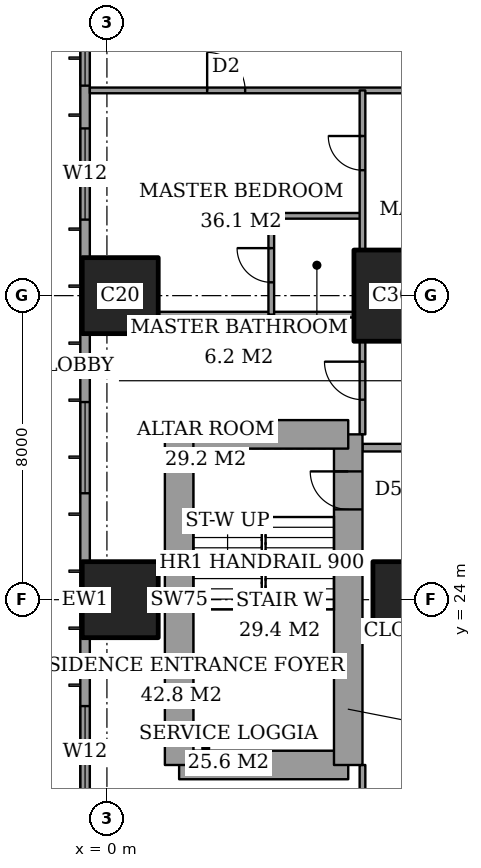
"""IFC4 building model, lengths in metres.
Left out: names, types, materials, properties, quantities, classifications, styles, units other than length and angle.
Written with IfcOpenShell. Run it as: python <this file> out.ifc"""

import sys

from ifc_helpers import new_model, si_unit, direction, frame, frame_2d, origin, origin_2d, place, context, subcontext, project, spatial, rectangle, extrude, element, fill, save


model = new_model("IFC4")
c1 = context("Model", 3, precision=1e-05, world=origin(), true_north=direction((0.0, 1.0)))
c2 = subcontext(c1, "Body", "Model", "MODEL_VIEW")
j1 = project(units=[si_unit("LENGTHUNIT", "METRE"), si_unit("PLANEANGLEUNIT", "RADIAN")], contexts=[c1])
p1 = place(None, origin())
s1 = spatial("IfcSite", under=j1, at=p1, CompositionType="ELEMENT")
p2 = place(p1, origin())
s2 = spatial("IfcBuilding", under=s1, at=p2, CompositionType="ELEMENT")
p3 = place(p2, frame((0.0, 0.0, 143.0)))
s3 = spatial("IfcBuildingStorey", under=s2, at=p3, CompositionType="ELEMENT", Elevation=143.0)
for number, where, z_axis, x_axis in (
    (1, (0.35, 24.0, 0.0), (0.0, 0.0, 1.0), (1.0, 0.0, 0.0)),
    (2, (0.35, 32.0, 0.0), (0.0, 0.0, 1.0), (1.0, 0.0, 0.0)),
    (3, (8.0, 24.0, 0.0), (0.0, 0.0, 1.0), (1.0, 0.0, 0.0)),
):
    element("IfcColumn", number, at=place(p3, frame(where, z_axis=z_axis, x_axis=x_axis)), inside=s3, PredefinedType="COLUMN", context=c2, shape_type="SweptSolid", body=[
        extrude(rectangle(XDim=2.0, YDim=2.0, at=origin_2d()), origin(), (0.0, 0.0, 1.0), 3.6),
    ])
p4 = place(p3, frame((8.0, 32.0, 0.0), z_axis=(0.0, 0.0, 1.0), x_axis=(1.0, 0.0, 0.0)))
e4 = element("IfcColumn", 4, at=p4, inside=s3, PredefinedType="COLUMN", context=c2, shape_type="SweptSolid", body=[
    extrude(rectangle(XDim=3.0, YDim=2.4, at=origin_2d()), origin(), (0.0, 0.0, 1.0), 3.6),
])
p5 = place(p3, frame((1.9, 19.65, 0.0), z_axis=(0.0, 0.0, 1.0), x_axis=(1.0, 0.0, 0.0)))
e5 = element("IfcWall", 5, at=p5, inside=s3, PredefinedType="SHEAR", context=c2, shape_type="SweptSolid", body=[
    extrude(rectangle(XDim=4.45, YDim=0.75, at=frame_2d((2.225, 0.0))), origin(), (0.0, 0.0, 1.0), 3.6),
])
p6 = place(p3, frame((6.35, 19.65, 0.0), z_axis=(0.0, 0.0, 1.0), x_axis=(0.0, 1.0, 0.0)))
e6 = element("IfcWall", 6, at=p6, inside=s3, PredefinedType="SHEAR", context=c2, shape_type="SweptSolid", body=[
    extrude(rectangle(XDim=8.7, YDim=0.75, at=frame_2d((4.35, 0.0))), origin(), (0.0, 0.0, 1.0), 3.6),
])
p7 = place(p6, frame((6.725, 0.0, 0.0)))
e7 = element("IfcOpeningElement", 7, at=p7, cuts=e6, PredefinedType="OPENING", context=c2, shape_type="SweptSolid", body=[
    extrude(rectangle(XDim=1.0, YDim=2.1, at=frame_2d((0.5, 1.05))), frame((0.0, 0.385, 0.0), z_axis=(0.0, -1.0, 0.0), x_axis=(1.0, 0.0, 0.0)), (0.0, 0.0, 1.0), 0.77),
])
p8 = place(p3, frame((6.35, 28.35, 0.0), z_axis=(0.0, 0.0, 1.0), x_axis=(-1.0, 0.0, 0.0)))
e8 = element("IfcWall", 8, at=p8, inside=s3, PredefinedType="SHEAR", context=c2, shape_type="SweptSolid", body=[
    extrude(rectangle(XDim=4.45, YDim=0.75, at=frame_2d((2.225, 0.0))), origin(), (0.0, 0.0, 1.0), 3.6),
])
p9 = place(p3, frame((1.9, 28.35, 0.0), z_axis=(0.0, 0.0, 1.0), x_axis=(0.0, -1.0, 0.0)))
e9 = element("IfcWall", 9, at=p9, inside=s3, PredefinedType="SHEAR", context=c2, shape_type="SweptSolid", body=[
    extrude(rectangle(XDim=8.7, YDim=0.75, at=frame_2d((4.35, 0.0))), origin(), (0.0, 0.0, 1.0), 3.6),
])
p10 = place(p3, frame((-0.575, 44.825, 0.0), z_axis=(0.0, 0.0, 1.0), x_axis=(0.0, -1.0, 0.0)))
e10 = element("IfcWall", 10, at=p10, inside=s3, PredefinedType="SOLIDWALL", context=c2, shape_type="SweptSolid", body=[
    extrude(rectangle(XDim=41.65, YDim=0.25, at=frame_2d((20.825, 0.0))), origin(), (0.0, 0.0, 1.0), 3.6),
])
p11 = place(p10, frame((0.775, 0.0, 0.4)))
e11 = element("IfcOpeningElement", 11, at=p11, cuts=e10, PredefinedType="OPENING", context=c2, shape_type="SweptSolid", body=[
    extrude(rectangle(XDim=2.4, YDim=2.2, at=frame_2d((1.2, 1.1))), frame((0.0, 0.135, 0.0), z_axis=(0.0, -1.0, 0.0), x_axis=(1.0, 0.0, 0.0)), (0.0, 0.0, 1.0), 0.27),
])
p12 = place(p10, frame((6.1, 0.0, 0.4)))
e12 = element("IfcOpeningElement", 12, at=p12, cuts=e10, PredefinedType="OPENING", context=c2, shape_type="SweptSolid", body=[
    extrude(rectangle(XDim=1.2, YDim=2.2, at=frame_2d((0.6, 1.1))), frame((0.0, 0.135, 0.0), z_axis=(0.0, -1.0, 0.0), x_axis=(1.0, 0.0, 0.0)), (0.0, 0.0, 1.0), 0.27),
])
p13 = place(p10, frame((8.425, 0.0, 0.4)))
e13 = element("IfcOpeningElement", 13, at=p13, cuts=e10, PredefinedType="OPENING", context=c2, shape_type="SweptSolid", body=[
    extrude(rectangle(XDim=2.4, YDim=2.2, at=frame_2d((1.2, 1.1))), frame((0.0, 0.135, 0.0), z_axis=(0.0, -1.0, 0.0), x_axis=(1.0, 0.0, 0.0)), (0.0, 0.0, 1.0), 0.27),
])
p14 = place(p10, frame((15.625, 0.0, 0.4)))
e14 = element("IfcOpeningElement", 14, at=p14, cuts=e10, PredefinedType="OPENING", context=c2, shape_type="SweptSolid", body=[
    extrude(rectangle(XDim=2.4, YDim=2.2, at=frame_2d((1.2, 1.1))), frame((0.0, 0.135, 0.0), z_axis=(0.0, -1.0, 0.0), x_axis=(1.0, 0.0, 0.0)), (0.0, 0.0, 1.0), 0.27),
])
p15 = place(p10, frame((23.625, 0.0, 0.4)))
e15 = element("IfcOpeningElement", 15, at=p15, cuts=e10, PredefinedType="OPENING", context=c2, shape_type="SweptSolid", body=[
    extrude(rectangle(XDim=2.4, YDim=2.2, at=frame_2d((1.2, 1.1))), frame((0.0, 0.135, 0.0), z_axis=(0.0, -1.0, 0.0), x_axis=(1.0, 0.0, 0.0)), (0.0, 0.0, 1.0), 0.27),
])
p16 = place(p10, frame((30.625, 0.0, 0.4)))
e16 = element("IfcOpeningElement", 16, at=p16, cuts=e10, PredefinedType="OPENING", context=c2, shape_type="SweptSolid", body=[
    extrude(rectangle(XDim=2.4, YDim=2.2, at=frame_2d((1.2, 1.1))), frame((0.0, 0.135, 0.0), z_axis=(0.0, -1.0, 0.0), x_axis=(1.0, 0.0, 0.0)), (0.0, 0.0, 1.0), 0.27),
])
p17 = place(p10, frame((34.225, 0.0, 0.4)))
e17 = element("IfcOpeningElement", 17, at=p17, cuts=e10, PredefinedType="OPENING", context=c2, shape_type="SweptSolid", body=[
    extrude(rectangle(XDim=1.2, YDim=2.2, at=frame_2d((0.6, 1.1))), frame((0.0, 0.135, 0.0), z_axis=(0.0, -1.0, 0.0), x_axis=(1.0, 0.0, 0.0)), (0.0, 0.0, 1.0), 0.27),
])
p18 = place(p10, frame((38.475, 0.0, 0.4)))
e18 = element("IfcOpeningElement", 18, at=p18, cuts=e10, PredefinedType="OPENING", context=c2, shape_type="SweptSolid", body=[
    extrude(rectangle(XDim=2.4, YDim=2.2, at=frame_2d((1.2, 1.1))), frame((0.0, 0.135, 0.0), z_axis=(0.0, -1.0, 0.0), x_axis=(1.0, 0.0, 0.0)), (0.0, 0.0, 1.0), 0.27),
])
p19 = place(p3, frame((6.725, 28.0, 0.0), z_axis=(0.0, 0.0, 1.0), x_axis=(1.0, 0.0, 0.0)))
e19 = element("IfcWall", 19, at=p19, inside=s3, PredefinedType="PARTITIONING", context=c2, shape_type="SweptSolid", body=[
    extrude(rectangle(XDim=17.275, YDim=0.2, at=frame_2d((8.637, 0.0))), origin(), (0.0, 0.0, 1.0), 3.35),
])
p20 = place(p19, frame((6.475, 0.0, 0.0)))
e20 = element("IfcOpeningElement", 20, at=p20, cuts=e19, PredefinedType="OPENING", context=c2, shape_type="SweptSolid", body=[
    extrude(rectangle(XDim=1.2, YDim=2.4, at=frame_2d((0.6, 1.2))), frame((0.0, 0.11, 0.0), z_axis=(0.0, -1.0, 0.0), x_axis=(1.0, 0.0, 0.0)), (0.0, 0.0, 1.0), 0.22),
])
p21 = place(p3, frame((1.35, 31.5, 0.0), z_axis=(0.0, 0.0, 1.0), x_axis=(1.0, 0.0, 0.0)))
e21 = element("IfcWall", 21, at=p21, inside=s3, PredefinedType="PARTITIONING", context=c2, shape_type="SweptSolid", body=[
    extrude(rectangle(XDim=5.15, YDim=0.15, at=frame_2d((2.575, 0.0))), origin(), (0.0, 0.0, 1.0), 3.35),
])
p22 = place(p3, frame((4.325, 34.1, 0.0), z_axis=(0.0, 0.0, 1.0), x_axis=(1.0, 0.0, 0.0)))
e22 = element("IfcWall", 22, at=p22, inside=s3, PredefinedType="PARTITIONING", context=c2, shape_type="SweptSolid", body=[
    extrude(rectangle(XDim=2.4, YDim=0.15, at=frame_2d((1.2, 0.0))), origin(), (0.0, 0.0, 1.0), 3.35),
])
p23 = place(p3, frame((-0.45, 37.4, 0.0), z_axis=(0.0, 0.0, 1.0), x_axis=(1.0, 0.0, 0.0)))
e23 = element("IfcWall", 23, at=p23, inside=s3, PredefinedType="PARTITIONING", context=c2, shape_type="SweptSolid", body=[
    extrude(rectangle(XDim=25.011, YDim=0.15, at=frame_2d((12.505, 0.0))), origin(), (0.0, 0.0, 1.0), 3.35),
])
p24 = place(p23, frame((10.65, 0.0, 0.0)))
e24 = element("IfcOpeningElement", 24, at=p24, cuts=e23, PredefinedType="OPENING", context=c2, shape_type="SweptSolid", body=[
    extrude(rectangle(XDim=1.0, YDim=2.1, at=frame_2d((0.5, 1.05))), frame((0.0, 0.085, 0.0), z_axis=(0.0, -1.0, 0.0), x_axis=(1.0, 0.0, 0.0)), (0.0, 0.0, 1.0), 0.17),
])
p25 = place(p23, frame((3.087, 0.0, 0.0)))
e25 = element("IfcOpeningElement", 25, at=p25, cuts=e23, PredefinedType="OPENING", context=c2, shape_type="SweptSolid", body=[
    extrude(rectangle(XDim=1.0, YDim=2.1, at=frame_2d((0.5, 1.05))), frame((0.0, 0.085, 0.0), z_axis=(0.0, -1.0, 0.0), x_axis=(1.0, 0.0, 0.0)), (0.0, 0.0, 1.0), 0.17),
])
p26 = place(p23, frame((13.45, 0.0, 0.0)))
e26 = element("IfcOpeningElement", 26, at=p26, cuts=e23, PredefinedType="OPENING", context=c2, shape_type="SweptSolid", body=[
    extrude(rectangle(XDim=1.0, YDim=2.1, at=frame_2d((0.5, 1.05))), frame((0.0, 0.085, 0.0), z_axis=(0.0, -1.0, 0.0), x_axis=(1.0, 0.0, 0.0)), (0.0, 0.0, 1.0), 0.17),
])
p27 = place(p23, frame((16.55, 0.0, 0.0)))
e27 = element("IfcOpeningElement", 27, at=p27, cuts=e23, PredefinedType="OPENING", context=c2, shape_type="SweptSolid", body=[
    extrude(rectangle(XDim=1.0, YDim=2.1, at=frame_2d((0.5, 1.05))), frame((0.0, 0.085, 0.0), z_axis=(0.0, -1.0, 0.0), x_axis=(1.0, 0.0, 0.0)), (0.0, 0.0, 1.0), 0.17),
])
p28 = place(p23, frame((21.175, 0.0, 0.0)))
e28 = element("IfcOpeningElement", 28, at=p28, cuts=e23, PredefinedType="OPENING", context=c2, shape_type="SweptSolid", body=[
    extrude(rectangle(XDim=1.0, YDim=2.1, at=frame_2d((0.5, 1.05))), frame((0.0, 0.085, 0.0), z_axis=(0.0, -1.0, 0.0), x_axis=(1.0, 0.0, 0.0)), (0.0, 0.0, 1.0), 0.17),
])
p29 = place(p3, frame((4.325, 31.5, 0.0), z_axis=(0.0, 0.0, 1.0), x_axis=(0.0, 1.0, 0.0)))
e29 = element("IfcWall", 29, at=p29, inside=s3, PredefinedType="PARTITIONING", context=c2, shape_type="SweptSolid", body=[
    extrude(rectangle(XDim=2.6, YDim=0.15, at=frame_2d((1.3, 0.0))), origin(), (0.0, 0.0, 1.0), 3.35),
])
p30 = place(p29, frame((0.85, 0.0, 0.0)))
e30 = element("IfcOpeningElement", 30, at=p30, cuts=e29, PredefinedType="OPENING", context=c2, shape_type="SweptSolid", body=[
    extrude(rectangle(XDim=0.9, YDim=2.1, at=frame_2d((0.45, 1.05))), frame((0.0, 0.085, 0.0), z_axis=(0.0, -1.0, 0.0), x_axis=(1.0, 0.0, 0.0)), (0.0, 0.0, 1.0), 0.17),
])
p31 = place(p3, frame((6.725, 17.2, 0.0), z_axis=(0.0, 0.0, 1.0), x_axis=(0.0, 1.0, 0.0)))
e31 = element("IfcWall", 31, at=p31, inside=s3, PredefinedType="PARTITIONING", context=c2, shape_type="SweptSolid", body=[
    extrude(rectangle(XDim=2.45, YDim=0.15, at=frame_2d((1.225, 0.0))), origin(), (0.0, 0.0, 1.0), 3.35),
])
p32 = place(p31, frame((0.587, 0.0, 0.0)))
e32 = element("IfcOpeningElement", 32, at=p32, cuts=e31, PredefinedType="OPENING", context=c2, shape_type="SweptSolid", body=[
    extrude(rectangle(XDim=0.9, YDim=2.1, at=frame_2d((0.45, 1.05))), frame((0.0, 0.085, 0.0), z_axis=(0.0, -1.0, 0.0), x_axis=(1.0, 0.0, 0.0)), (0.0, 0.0, 1.0), 0.17),
])
p33 = place(p3, frame((6.725, 28.35, 0.0), z_axis=(0.0, 0.0, 1.0), x_axis=(0.0, 1.0, 0.0)))
e33 = element("IfcWall", 33, at=p33, inside=s3, PredefinedType="PARTITIONING", context=c2, shape_type="SweptSolid", body=[
    extrude(rectangle(XDim=2.45, YDim=0.15, at=frame_2d((1.225, 0.0))), origin(), (0.0, 0.0, 1.0), 3.35),
])
p34 = place(p33, frame((0.913, 0.0, 0.0)))
e34 = element("IfcOpeningElement", 34, at=p34, cuts=e33, PredefinedType="OPENING", context=c2, shape_type="SweptSolid", body=[
    extrude(rectangle(XDim=1.0, YDim=2.1, at=frame_2d((0.5, 1.05))), frame((0.0, 0.085, 0.0), z_axis=(0.0, -1.0, 0.0), x_axis=(1.0, 0.0, 0.0)), (0.0, 0.0, 1.0), 0.17),
])
p35 = place(p3, frame((6.725, 33.2, 0.0), z_axis=(0.0, 0.0, 1.0), x_axis=(0.0, 1.0, 0.0)))
e35 = element("IfcWall", 35, at=p35, inside=s3, PredefinedType="PARTITIONING", context=c2, shape_type="SweptSolid", body=[
    extrude(rectangle(XDim=4.2, YDim=0.15, at=frame_2d((2.1, 0.0))), origin(), (0.0, 0.0, 1.0), 3.35),
])
p36 = place(p35, frame((2.1, 0.0, 0.0)))
e36 = element("IfcOpeningElement", 36, at=p36, cuts=e35, PredefinedType="OPENING", context=c2, shape_type="SweptSolid", body=[
    extrude(rectangle(XDim=0.9, YDim=2.1, at=frame_2d((0.45, 1.05))), frame((0.0, 0.085, 0.0), z_axis=(0.0, -1.0, 0.0), x_axis=(1.0, 0.0, 0.0)), (0.0, 0.0, 1.0), 0.17),
])
p37 = place(p12, origin())
e37 = element("IfcWindow", 37, at=p37, inside=s3, PartitioningType="SINGLE_PANEL", PredefinedType="WINDOW", context=c2, shape_type="SweptSolid", body=[
    extrude(rectangle(XDim=1.2, YDim=2.2, at=frame_2d((0.6, 1.1))), frame((0.0, 0.03, 0.0), z_axis=(0.0, -1.0, 0.0), x_axis=(1.0, 0.0, 0.0)), (0.0, 0.0, 1.0), 0.06),
])
fill(e12, e37)
p38 = place(p13, origin())
e38 = element("IfcWindow", 38, at=p38, inside=s3, PartitioningType="SINGLE_PANEL", PredefinedType="WINDOW", context=c2, shape_type="SweptSolid", body=[
    extrude(rectangle(XDim=2.4, YDim=2.2, at=frame_2d((1.2, 1.1))), frame((0.0, 0.03, 0.0), z_axis=(0.0, -1.0, 0.0), x_axis=(1.0, 0.0, 0.0)), (0.0, 0.0, 1.0), 0.06),
])
fill(e13, e38)
p39 = place(p14, origin())
e39 = element("IfcWindow", 39, at=p39, inside=s3, PartitioningType="SINGLE_PANEL", PredefinedType="WINDOW", context=c2, shape_type="SweptSolid", body=[
    extrude(rectangle(XDim=2.4, YDim=2.2, at=frame_2d((1.2, 1.1))), frame((0.0, 0.03, 0.0), z_axis=(0.0, -1.0, 0.0), x_axis=(1.0, 0.0, 0.0)), (0.0, 0.0, 1.0), 0.06),
])
fill(e14, e39)
p40 = place(p15, origin())
e40 = element("IfcWindow", 40, at=p40, inside=s3, PartitioningType="SINGLE_PANEL", PredefinedType="WINDOW", context=c2, shape_type="SweptSolid", body=[
    extrude(rectangle(XDim=2.4, YDim=2.2, at=frame_2d((1.2, 1.1))), frame((0.0, 0.03, 0.0), z_axis=(0.0, -1.0, 0.0), x_axis=(1.0, 0.0, 0.0)), (0.0, 0.0, 1.0), 0.06),
])
fill(e15, e40)
p41 = place(p30, origin())
e41 = element("IfcDoor", 41, at=p41, inside=s3, OperationType="SINGLE_SWING_LEFT", PredefinedType="DOOR", context=c2, shape_type="SweptSolid", body=[
    extrude(rectangle(XDim=0.9, YDim=2.1, at=frame_2d((0.45, 1.05))), frame((0.0, 0.025, 0.0), z_axis=(0.0, -1.0, 0.0), x_axis=(1.0, 0.0, 0.0)), (0.0, 0.0, 1.0), 0.05),
])
fill(e30, e41)
p42 = place(p25, origin())
e42 = element("IfcDoor", 42, at=p42, inside=s3, OperationType="SINGLE_SWING_RIGHT", PredefinedType="DOOR", context=c2, shape_type="SweptSolid", body=[
    extrude(rectangle(XDim=1.0, YDim=2.1, at=frame_2d((0.5, 1.05))), frame((0.0, 0.025, 0.0), z_axis=(0.0, -1.0, 0.0), x_axis=(1.0, 0.0, 0.0)), (0.0, 0.0, 1.0), 0.05),
])
fill(e25, e42)
p43 = place(p34, origin())
e43 = element("IfcDoor", 43, at=p43, inside=s3, OperationType="SINGLE_SWING_LEFT", PredefinedType="DOOR", context=c2, shape_type="SweptSolid", body=[
    extrude(rectangle(XDim=1.0, YDim=2.1, at=frame_2d((0.5, 1.05))), frame((0.0, 0.025, 0.0), z_axis=(0.0, -1.0, 0.0), x_axis=(1.0, 0.0, 0.0)), (0.0, 0.0, 1.0), 0.05),
])
fill(e34, e43)
p44 = place(p36, origin())
e44 = element("IfcDoor", 44, at=p44, inside=s3, OperationType="SINGLE_SWING_LEFT", PredefinedType="DOOR", context=c2, shape_type="SweptSolid", body=[
    extrude(rectangle(XDim=0.9, YDim=2.1, at=frame_2d((0.45, 1.05))), frame((0.0, 0.025, 0.0), z_axis=(0.0, -1.0, 0.0), x_axis=(1.0, 0.0, 0.0)), (0.0, 0.0, 1.0), 0.05),
])
fill(e36, e44)
p45 = place(p7, origin())
e45 = element("IfcDoor", 45, at=p45, inside=s3, OperationType="SINGLE_SWING_LEFT", PredefinedType="DOOR", context=c2, shape_type="SweptSolid", body=[
    extrude(rectangle(XDim=1.0, YDim=2.1, at=frame_2d((0.5, 1.05))), frame((0.0, 0.025, 0.0), z_axis=(0.0, -1.0, 0.0), x_axis=(1.0, 0.0, 0.0)), (0.0, 0.0, 1.0), 0.05),
])
fill(e7, e45)
save(model, sys.argv[1])
